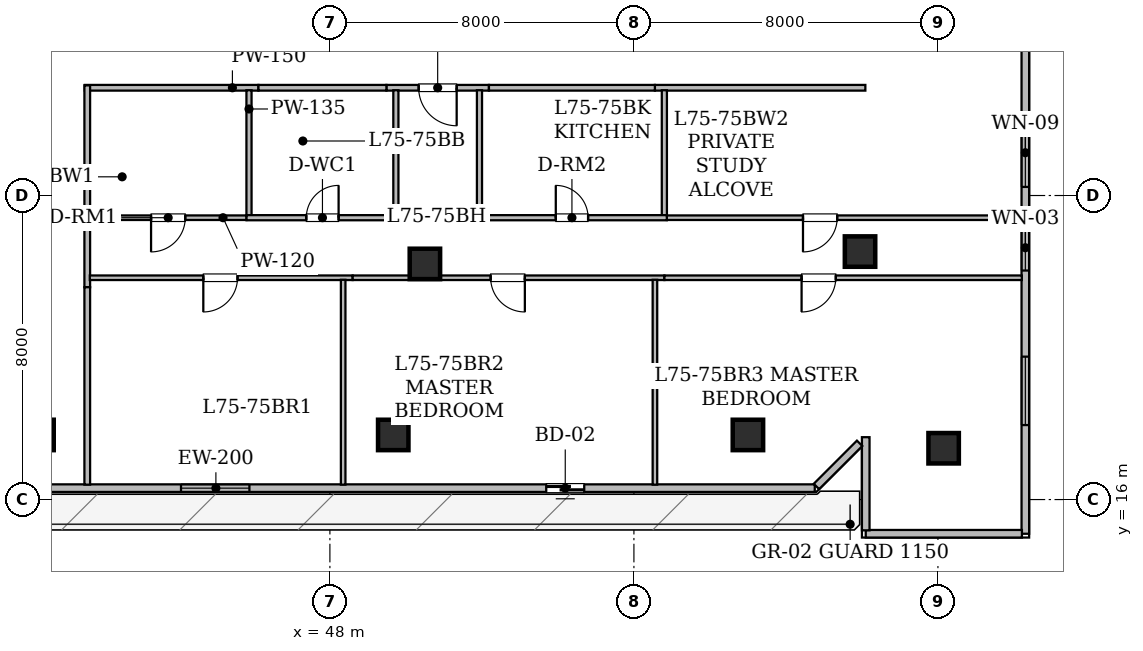
"""IFC4 building model, lengths in metres.
Left out: names, types, materials, properties, quantities, classifications, styles, units other than length and angle.
Written with IfcOpenShell. Run it as: python <this file> out.ifc"""

import sys

from ifc_helpers import new_model, si_unit, direction, frame, frame_2d, origin, origin_2d, place, context, subcontext, project, spatial, rectangle, hollow_rectangle, extrude, element, fill, save


model = new_model("IFC4")
c1 = context("Model", 3, precision=1e-05, world=origin(), true_north=direction((0.0, 1.0)))
c2 = subcontext(c1, "Body", "Model", "MODEL_VIEW")
j1 = project(units=[si_unit("LENGTHUNIT", "METRE"), si_unit("PLANEANGLEUNIT", "RADIAN")], contexts=[c1])
p1 = place(None, origin())
s1 = spatial("IfcSite", under=j1, at=p1, CompositionType="ELEMENT")
p2 = place(p1, origin())
s2 = spatial("IfcBuilding", under=s1, at=p2, CompositionType="ELEMENT")
p3 = place(p2, frame((0.0, 0.0, 294.65)))
s3 = spatial("IfcBuildingStorey", under=s2, at=p3, CompositionType="ELEMENT", Elevation=294.65)
for number, where, z_axis, x_axis in (
    (1, (40.333, 17.7, 0.025), (0.0, 0.0, 1.0), (1.0, 0.0, 0.0)),
    (2, (49.667, 17.7, 0.025), (0.0, 0.0, 1.0), (1.0, 0.0, 0.0)),
    (3, (59.0, 17.7, 0.025), (0.0, 0.0, 1.0), (1.0, 0.0, 0.0)),
    (4, (61.95, 22.525, 0.025), (0.0, 0.0, 1.0), (1.0, 0.0, 0.0)),
):
    element("IfcColumn", number, at=place(p3, frame(where, z_axis=z_axis, x_axis=x_axis)), inside=s3, PredefinedType="COLUMN", context=c2, shape_type="SweptSolid", body=[
        extrude(hollow_rectangle(XDim=0.8, YDim=0.8, WallThickness=0.04, at=origin_2d()), origin(), (0.0, 0.0, 1.0), 4.175),
    ])
p4 = place(p3, frame((50.5, 22.2, 0.0), z_axis=(0.0, 0.0, 1.0), x_axis=(1.0, 0.0, 0.0)))
e5 = element("IfcColumn", 5, at=p4, inside=s3, PredefinedType="COLUMN", context=c2, shape_type="SweptSolid", body=[
    extrude(hollow_rectangle(XDim=0.8, YDim=0.8, WallThickness=0.04, at=origin_2d()), origin(), (0.0, 0.0, 1.0), 4.2),
])
p5 = place(p3, frame((64.15, 17.35, 0.025), z_axis=(0.0, 0.0, 1.0), x_axis=(1.0, 0.0, 0.0)))
e6 = element("IfcColumn", 6, at=p5, inside=s3, PredefinedType="COLUMN", context=c2, shape_type="SweptSolid", body=[
    extrude(hollow_rectangle(XDim=0.8, YDim=0.8, WallThickness=0.04, at=origin_2d()), origin(), (0.0, 0.0, 1.0), 4.175),
])
p6 = place(p3, frame((60.759, 16.3, 0.0), z_axis=(0.0, 0.0, 1.0), x_axis=(-1.0, 0.0, 0.0)))
e7 = element("IfcWall", 7, at=p6, inside=s3, PredefinedType="STANDARD", context=c2, shape_type="SweptSolid", body=[
    extrude(rectangle(XDim=31.518, YDim=0.2, at=frame_2d((15.759, 0.0))), origin(), (0.0, 0.0, 1.0), 3.95),
])
p7 = place(p6, frame((6.066, 0.0, 0.0)))
e8 = element("IfcOpeningElement", 8, at=p7, cuts=e7, PredefinedType="OPENING", context=c2, shape_type="SweptSolid", body=[
    extrude(rectangle(XDim=1.0, YDim=2.15, at=frame_2d((0.5, 1.075))), frame((0.0, 0.11, 0.0), z_axis=(0.0, -1.0, 0.0), x_axis=(1.0, 0.0, 0.0)), (0.0, 0.0, 1.0), 0.22),
])
p8 = place(p6, frame((14.877, 0.0, 0.85)))
e9 = element("IfcOpeningElement", 9, at=p8, cuts=e7, PredefinedType="OPENING", context=c2, shape_type="SweptSolid", body=[
    extrude(rectangle(XDim=1.8, YDim=0.92, at=frame_2d((0.9, 0.46))), frame((0.0, 0.11, 0.0), z_axis=(0.0, -1.0, 0.0), x_axis=(1.0, 0.0, 0.0)), (0.0, 0.0, 1.0), 0.22),
])
p9 = place(p3, frame((66.3, 40.81, 0.0), z_axis=(0.0, 0.0, 1.0), x_axis=(0.0, -1.0, 0.0)))
e10 = element("IfcWall", 10, at=p9, inside=s3, PredefinedType="STANDARD", context=c2, shape_type="SweptSolid", body=[
    extrude(rectangle(XDim=25.71, YDim=0.2, at=frame_2d((12.855, 0.0))), origin(), (0.0, 0.0, 1.0), 3.95),
])
p10 = place(p9, frame((14.784, 0.0, 0.85)))
e11 = element("IfcOpeningElement", 11, at=p10, cuts=e10, PredefinedType="OPENING", context=c2, shape_type="SweptSolid", body=[
    extrude(rectangle(XDim=1.8, YDim=0.92, at=frame_2d((0.9, 0.46))), frame((0.0, 0.11, 0.0), z_axis=(0.0, -1.0, 0.0), x_axis=(1.0, 0.0, 0.0)), (0.0, 0.0, 1.0), 0.22),
])
p11 = place(p9, frame((17.584, 0.0, 0.78)))
e12 = element("IfcOpeningElement", 12, at=p11, cuts=e10, PredefinedType="OPENING", context=c2, shape_type="SweptSolid", body=[
    extrude(rectangle(XDim=1.2, YDim=1.5, at=frame_2d((0.6, 0.75))), frame((0.0, 0.11, 0.0), z_axis=(0.0, -1.0, 0.0), x_axis=(1.0, 0.0, 0.0)), (0.0, 0.0, 1.0), 0.22),
])
p12 = place(p9, frame((21.05, 0.0, 0.85)))
e13 = element("IfcOpeningElement", 13, at=p12, cuts=e10, PredefinedType="OPENING", context=c2, shape_type="SweptSolid", body=[
    extrude(rectangle(XDim=1.8, YDim=0.92, at=frame_2d((0.9, 0.46))), frame((0.0, 0.11, 0.0), z_axis=(0.0, -1.0, 0.0), x_axis=(1.0, 0.0, 0.0)), (0.0, 0.0, 1.0), 0.22),
])
p13 = place(p9, frame((7.176, 0.0, 0.78)))
e14 = element("IfcOpeningElement", 14, at=p13, cuts=e10, PredefinedType="OPENING", context=c2, shape_type="SweptSolid", body=[
    extrude(rectangle(XDim=1.2, YDim=1.5, at=frame_2d((0.6, 0.75))), frame((0.0, 0.11, 0.0), z_axis=(0.0, -1.0, 0.0), x_axis=(1.0, 0.0, 0.0)), (0.0, 0.0, 1.0), 0.22),
])
p14 = place(p9, frame((2.985, 0.0, 0.85)))
e15 = element("IfcOpeningElement", 15, at=p14, cuts=e10, PredefinedType="OPENING", context=c2, shape_type="SweptSolid", body=[
    extrude(rectangle(XDim=1.8, YDim=0.92, at=frame_2d((0.9, 0.46))), frame((0.0, 0.11, 0.0), z_axis=(0.0, -1.0, 0.0), x_axis=(1.0, 0.0, 0.0)), (0.0, 0.0, 1.0), 0.22),
])
p15 = place(p3, frame((66.21, 15.1, 0.0), z_axis=(0.0, 0.0, 1.0), x_axis=(-1.0, 0.0, 0.0)))
e16 = element("IfcWall", 16, at=p15, inside=s3, PredefinedType="STANDARD", context=c2, shape_type="SweptSolid", body=[
    extrude(rectangle(XDim=4.11, YDim=0.2, at=frame_2d((2.055, 0.0))), origin(), (0.0, 0.0, 1.0), 3.95),
])
p16 = place(p3, frame((62.1, 15.19, 0.0), z_axis=(0.0, 0.0, 1.0), x_axis=(0.0, 1.0, 0.0)))
e17 = element("IfcWall", 17, at=p16, inside=s3, PredefinedType="STANDARD", context=c2, shape_type="SweptSolid", body=[
    extrude(rectangle(XDim=2.451, YDim=0.2, at=frame_2d((1.226, 0.0))), origin(), (0.0, 0.0, 1.0), 3.95),
])
p17 = place(p3, frame((61.939, 17.48, 0.0), z_axis=(0.0, 0.0, 1.0), x_axis=(-0.707106781187, -0.707106781187, 0.0)))
e18 = element("IfcWall", 18, at=p17, inside=s3, PredefinedType="STANDARD", context=c2, shape_type="SweptSolid", body=[
    extrude(rectangle(XDim=1.606, YDim=0.2, at=frame_2d((0.803, 0.0))), origin(), (0.0, 0.0, 1.0), 3.95),
])
p18 = place(p3, frame((46.12, 26.835, 0.0), z_axis=(0.0, 0.0, 1.0), x_axis=(-1.0, 0.0, 0.0)))
e19 = element("IfcWall", 19, at=p18, inside=s3, PredefinedType="STANDARD", context=c2, shape_type="SweptSolid", body=[
    extrude(rectangle(XDim=4.57, YDim=0.15, at=frame_2d((2.285, 0.0))), origin(), (0.0, 0.0, 1.0), 3.95),
])
p19 = place(p3, frame((41.615, 26.898, 0.0), z_axis=(0.0, 0.0, 1.0), x_axis=(0.0, -1.0, 0.0)))
e20 = element("IfcWall", 20, at=p19, inside=s3, PredefinedType="STANDARD", context=c2, shape_type="SweptSolid", body=[
    extrude(rectangle(XDim=3.731, YDim=0.15, at=frame_2d((1.865, 0.0))), origin(), (0.0, 0.0, 1.0), 3.245),
])
p20 = place(p3, frame((62.09, 26.835, 0.0), z_axis=(0.0, 0.0, 1.0), x_axis=(-1.0, 0.0, 0.0)))
e21 = element("IfcWall", 21, at=p20, inside=s3, PredefinedType="STANDARD", context=c2, shape_type="SweptSolid", body=[
    extrude(rectangle(XDim=5.538, YDim=0.15, at=frame_2d((2.769, 0.0))), origin(), (0.0, 0.0, 1.0), 3.407),
])
p21 = place(p3, frame((52.185, 26.835, 0.0), z_axis=(0.0, 0.0, 1.0), x_axis=(-1.0, 0.0, 0.0)))
e22 = element("IfcWall", 22, at=p21, inside=s3, PredefinedType="STANDARD", context=c2, shape_type="SweptSolid", body=[
    extrude(rectangle(XDim=2.698, YDim=0.15, at=frame_2d((1.349, 0.0))), origin(), (0.0, 0.0, 1.0), 3.245),
])
p22 = place(p21, frame((0.849, 0.0, 0.0)))
e23 = element("IfcOpeningElement", 23, at=p22, cuts=e22, PredefinedType="OPENING", context=c2, shape_type="SweptSolid", body=[
    extrude(rectangle(XDim=1.0, YDim=2.15, at=frame_2d((0.5, 1.075))), frame((0.0, 0.085, 0.0), z_axis=(0.0, -1.0, 0.0), x_axis=(1.0, 0.0, 0.0)), (0.0, 0.0, 1.0), 0.17),
])
p23 = place(p3, frame((41.615, 23.167, 0.0), z_axis=(0.0, 0.0, 1.0), x_axis=(0.0, -1.0, 0.0)))
e24 = element("IfcWall", 24, at=p23, inside=s3, PredefinedType="STANDARD", context=c2, shape_type="SweptSolid", body=[
    extrude(rectangle(XDim=1.58, YDim=0.15, at=frame_2d((0.79, 0.0))), origin(), (0.0, 0.0, 1.0), 3.95),
])
p24 = place(p3, frame((49.487, 26.835, 0.0), z_axis=(0.0, 0.0, 1.0), x_axis=(-1.0, 0.0, 0.0)))
e25 = element("IfcWall", 25, at=p24, inside=s3, PredefinedType="STANDARD", context=c2, shape_type="SweptSolid", body=[
    extrude(rectangle(XDim=3.367, YDim=0.15, at=frame_2d((1.684, 0.0))), origin(), (0.0, 0.0, 1.0), 3.95),
])
p25 = place(p3, frame((56.552, 26.835, 0.0), z_axis=(0.0, 0.0, 1.0), x_axis=(-1.0, 0.0, 0.0)))
e26 = element("IfcWall", 26, at=p25, inside=s3, PredefinedType="STANDARD", context=c2, shape_type="SweptSolid", body=[
    extrude(rectangle(XDim=4.367, YDim=0.15, at=frame_2d((2.184, 0.0))), origin(), (0.0, 0.0, 1.0), 3.95),
])
p26 = place(p3, frame((41.615, 21.587, 0.0), z_axis=(0.0, 0.0, 1.0), x_axis=(0.0, -1.0, 0.0)))
e27 = element("IfcWall", 27, at=p26, inside=s3, PredefinedType="STANDARD", context=c2, shape_type="SweptSolid", body=[
    extrude(rectangle(XDim=5.195, YDim=0.15, at=frame_2d((2.597, 0.0))), origin(), (0.0, 0.0, 1.0), 3.407),
])
p27 = place(p3, frame((45.806, 23.416, 0.0), z_axis=(0.0, 0.0, 1.0), x_axis=(-1.0, 0.0, 0.0)))
e28 = element("IfcWall", 28, at=p27, inside=s3, PredefinedType="PARTITIONING", context=c2, shape_type="SweptSolid", body=[
    extrude(rectangle(XDim=4.124, YDim=0.12, at=frame_2d((2.062, 0.0))), origin(), (0.0, 0.0, 1.0), 3.245),
])
p28 = place(p27, frame((1.612, 0.0, 0.0)))
e29 = element("IfcOpeningElement", 29, at=p28, cuts=e28, PredefinedType="OPENING", context=c2, shape_type="SweptSolid", body=[
    extrude(rectangle(XDim=0.9, YDim=2.1, at=frame_2d((0.45, 1.05))), frame((0.0, 0.07, 0.0), z_axis=(0.0, -1.0, 0.0), x_axis=(1.0, 0.0, 0.0)), (0.0, 0.0, 1.0), 0.14),
])
p29 = place(p3, frame((45.871, 26.77, 0.0), z_axis=(0.0, 0.0, 1.0), x_axis=(0.0, -1.0, 0.0)))
e30 = element("IfcWall", 30, at=p29, inside=s3, PredefinedType="PARTITIONING", context=c2, shape_type="SweptSolid", body=[
    extrude(rectangle(XDim=3.289, YDim=0.135, at=frame_2d((1.645, 0.0))), origin(), (0.0, 0.0, 1.0), 3.95),
])
p30 = place(p3, frame((66.208, 23.416, 0.0), z_axis=(0.0, 0.0, 1.0), x_axis=(-1.0, 0.0, 0.0)))
e31 = element("IfcWall", 31, at=p30, inside=s3, PredefinedType="PARTITIONING", context=c2, shape_type="SweptSolid", body=[
    extrude(rectangle(XDim=9.342, YDim=0.12, at=frame_2d((4.671, 0.0))), origin(), (0.0, 0.0, 1.0), 3.245),
])
p31 = place(p30, frame((4.859, 0.0, 0.0)))
e32 = element("IfcOpeningElement", 32, at=p31, cuts=e31, PredefinedType="OPENING", context=c2, shape_type="SweptSolid", body=[
    extrude(rectangle(XDim=0.9, YDim=2.1, at=frame_2d((0.45, 1.05))), frame((0.0, 0.07, 0.0), z_axis=(0.0, -1.0, 0.0), x_axis=(1.0, 0.0, 0.0)), (0.0, 0.0, 1.0), 0.14),
])
p32 = place(p3, frame((56.801, 23.481, 0.0), z_axis=(0.0, 0.0, 1.0), x_axis=(0.0, 1.0, 0.0)))
e33 = element("IfcWall", 33, at=p32, inside=s3, PredefinedType="PARTITIONING", context=c2, shape_type="SweptSolid", body=[
    extrude(rectangle(XDim=3.289, YDim=0.135, at=frame_2d((1.645, 0.0))), origin(), (0.0, 0.0, 1.0), 3.95),
])
p33 = place(p3, frame((45.806, 23.416, 0.0), z_axis=(0.0, 0.0, 1.0), x_axis=(1.0, 0.0, 0.0)))
e34 = element("IfcWall", 34, at=p33, inside=s3, PredefinedType="PARTITIONING", context=c2, shape_type="SweptSolid", body=[
    extrude(rectangle(XDim=3.995, YDim=0.135, at=frame_2d((1.998, 0.0))), origin(), (0.0, 0.0, 1.0), 3.245),
])
p34 = place(p33, frame((1.573, 0.0, 0.0)))
e35 = element("IfcOpeningElement", 35, at=p34, cuts=e34, PredefinedType="OPENING", context=c2, shape_type="SweptSolid", body=[
    extrude(rectangle(XDim=0.85, YDim=2.1, at=frame_2d((0.425, 1.05))), frame((0.0, 0.077, 0.0), z_axis=(0.0, -1.0, 0.0), x_axis=(1.0, 0.0, 0.0)), (0.0, 0.0, 1.0), 0.155),
])
for number, where, z_axis, x_axis in (
    (36, (49.736, 23.351, 0.0), (0.0, 0.0, 1.0), (0.0, 1.0, 0.0)),
    (37, (51.936, 26.77, 0.0), (0.0, 0.0, 1.0), (0.0, -1.0, 0.0)),
):
    element("IfcWall", number, at=place(p3, frame(where, z_axis=z_axis, x_axis=x_axis)), inside=s3, PredefinedType="PARTITIONING", context=c2, shape_type="SweptSolid", body=[
        extrude(rectangle(XDim=3.419, YDim=0.135, at=frame_2d((1.709, 0.0))), origin(), (0.0, 0.0, 1.0), 3.95),
    ])
p35 = place(p3, frame((51.871, 23.416, 0.0), z_axis=(0.0, 0.0, 1.0), x_axis=(1.0, 0.0, 0.0)))
e38 = element("IfcWall", 38, at=p35, inside=s3, PredefinedType="PARTITIONING", context=c2, shape_type="SweptSolid", body=[
    extrude(rectangle(XDim=4.995, YDim=0.135, at=frame_2d((2.498, 0.0))), origin(), (0.0, 0.0, 1.0), 3.95),
])
p36 = place(p35, frame((2.073, 0.0, 0.0)))
e39 = element("IfcOpeningElement", 39, at=p36, cuts=e38, PredefinedType="OPENING", context=c2, shape_type="SweptSolid", body=[
    extrude(rectangle(XDim=0.85, YDim=2.1, at=frame_2d((0.425, 1.05))), frame((0.0, 0.077, 0.0), z_axis=(0.0, -1.0, 0.0), x_axis=(1.0, 0.0, 0.0)), (0.0, 0.0, 1.0), 0.155),
])
p37 = place(p3, frame((48.599, 21.836, 0.0), z_axis=(0.0, 0.0, 1.0), x_axis=(-1.0, 0.0, 0.0)))
e40 = element("IfcWall", 40, at=p37, inside=s3, PredefinedType="PARTITIONING", context=c2, shape_type="SweptSolid", body=[
    extrude(rectangle(XDim=6.917, YDim=0.12, at=frame_2d((3.458, 0.0))), origin(), (0.0, 0.0, 1.0), 3.95),
])
p38 = place(p37, frame((3.03, 0.0, 0.0)))
e41 = element("IfcOpeningElement", 41, at=p38, cuts=e40, PredefinedType="OPENING", context=c2, shape_type="SweptSolid", body=[
    extrude(rectangle(XDim=0.9, YDim=2.1, at=frame_2d((0.45, 1.05))), frame((0.0, 0.07, 0.0), z_axis=(0.0, -1.0, 0.0), x_axis=(1.0, 0.0, 0.0)), (0.0, 0.0, 1.0), 0.14),
])
p39 = place(p3, frame((56.802, 21.836, 0.0), z_axis=(0.0, 0.0, 1.0), x_axis=(-1.0, 0.0, 0.0)))
e42 = element("IfcWall", 42, at=p39, inside=s3, PredefinedType="PARTITIONING", context=c2, shape_type="SweptSolid", body=[
    extrude(rectangle(XDim=8.203, YDim=0.12, at=frame_2d((4.102, 0.0))), origin(), (0.0, 0.0, 1.0), 3.245),
])
p40 = place(p39, frame((3.672, 0.0, 0.0)))
e43 = element("IfcOpeningElement", 43, at=p40, cuts=e42, PredefinedType="OPENING", context=c2, shape_type="SweptSolid", body=[
    extrude(rectangle(XDim=0.9, YDim=2.1, at=frame_2d((0.45, 1.05))), frame((0.0, 0.07, 0.0), z_axis=(0.0, -1.0, 0.0), x_axis=(1.0, 0.0, 0.0)), (0.0, 0.0, 1.0), 0.14),
])
p41 = place(p3, frame((66.208, 21.836, 0.0), z_axis=(0.0, 0.0, 1.0), x_axis=(-1.0, 0.0, 0.0)))
e44 = element("IfcWall", 44, at=p41, inside=s3, PredefinedType="PARTITIONING", context=c2, shape_type="SweptSolid", body=[
    extrude(rectangle(XDim=9.406, YDim=0.12, at=frame_2d((4.703, 0.0))), origin(), (0.0, 0.0, 1.0), 3.245),
])
p42 = place(p41, frame((4.896, 0.0, 0.0)))
e45 = element("IfcOpeningElement", 45, at=p42, cuts=e44, PredefinedType="OPENING", context=c2, shape_type="SweptSolid", body=[
    extrude(rectangle(XDim=0.9, YDim=2.1, at=frame_2d((0.45, 1.05))), frame((0.0, 0.07, 0.0), z_axis=(0.0, -1.0, 0.0), x_axis=(1.0, 0.0, 0.0)), (0.0, 0.0, 1.0), 0.14),
])
p43 = place(p3, frame((48.349, 21.782, 0.0), z_axis=(0.0, 0.0, 1.0), x_axis=(0.0, -1.0, 0.0)))
e46 = element("IfcWall", 46, at=p43, inside=s3, PredefinedType="PARTITIONING", context=c2, shape_type="SweptSolid", body=[
    extrude(rectangle(XDim=5.39, YDim=0.12, at=frame_2d((2.695, 0.0))), origin(), (0.0, 0.0, 1.0), 3.407),
])
p44 = place(p3, frame((56.553, 21.782, 0.0), z_axis=(0.0, 0.0, 1.0), x_axis=(0.0, -1.0, 0.0)))
e47 = element("IfcWall", 47, at=p44, inside=s3, PredefinedType="PARTITIONING", context=c2, shape_type="SweptSolid", body=[
    extrude(rectangle(XDim=5.39, YDim=0.12, at=frame_2d((2.695, 0.0))), origin(), (0.0, 0.0, 1.0), 3.245),
])
p45 = place(p7, origin())
e48 = element("IfcDoor", 48, at=p45, inside=s3, OperationType="SLIDING_TO_LEFT", PredefinedType="DOOR", context=c2, shape_type="SweptSolid", body=[
    extrude(rectangle(XDim=1.0, YDim=2.15, at=frame_2d((0.5, 1.075))), frame((0.0, 0.025, 0.0), z_axis=(0.0, -1.0, 0.0), x_axis=(1.0, 0.0, 0.0)), (0.0, 0.0, 1.0), 0.05),
])
fill(e8, e48)
p46 = place(p10, origin())
e49 = element("IfcWindow", 49, at=p46, inside=s3, PartitioningType="SINGLE_PANEL", PredefinedType="WINDOW", context=c2, shape_type="SweptSolid", body=[
    extrude(rectangle(XDim=1.8, YDim=0.92, at=frame_2d((0.9, 0.46))), frame((0.0, 0.03, 0.0), z_axis=(0.0, -1.0, 0.0), x_axis=(1.0, 0.0, 0.0)), (0.0, 0.0, 1.0), 0.06),
])
fill(e11, e49)
p47 = place(p11, origin())
e50 = element("IfcWindow", 50, at=p47, inside=s3, PartitioningType="SINGLE_PANEL", PredefinedType="WINDOW", context=c2, shape_type="SweptSolid", body=[
    extrude(rectangle(XDim=1.2, YDim=1.5, at=frame_2d((0.6, 0.75))), frame((0.0, 0.03, 0.0), z_axis=(0.0, -1.0, 0.0), x_axis=(1.0, 0.0, 0.0)), (0.0, 0.0, 1.0), 0.06),
])
fill(e12, e50)
p48 = place(p8, origin())
e51 = element("IfcWindow", 51, at=p48, inside=s3, PartitioningType="SINGLE_PANEL", PredefinedType="WINDOW", context=c2, shape_type="SweptSolid", body=[
    extrude(rectangle(XDim=1.8, YDim=0.92, at=frame_2d((0.9, 0.46))), frame((0.0, 0.03, 0.0), z_axis=(0.0, -1.0, 0.0), x_axis=(1.0, 0.0, 0.0)), (0.0, 0.0, 1.0), 0.06),
])
fill(e9, e51)
p49 = place(p12, origin())
e52 = element("IfcWindow", 52, at=p49, inside=s3, PartitioningType="SINGLE_PANEL", PredefinedType="WINDOW", context=c2, shape_type="SweptSolid", body=[
    extrude(rectangle(XDim=1.8, YDim=0.92, at=frame_2d((0.9, 0.46))), frame((0.0, 0.03, 0.0), z_axis=(0.0, -1.0, 0.0), x_axis=(1.0, 0.0, 0.0)), (0.0, 0.0, 1.0), 0.06),
])
fill(e13, e52)
p50 = place(p22, origin())
e53 = element("IfcDoor", 53, at=p50, inside=s3, OperationType="SINGLE_SWING_LEFT", PredefinedType="DOOR", context=c2, shape_type="SweptSolid", body=[
    extrude(rectangle(XDim=1.0, YDim=2.15, at=frame_2d((0.5, 1.075))), frame((0.0, 0.025, 0.0), z_axis=(0.0, -1.0, 0.0), x_axis=(1.0, 0.0, 0.0)), (0.0, 0.0, 1.0), 0.05),
])
fill(e23, e53)
p51 = place(p28, origin())
e54 = element("IfcDoor", 54, at=p51, inside=s3, OperationType="SINGLE_SWING_RIGHT", PredefinedType="DOOR", context=c2, shape_type="SweptSolid", body=[
    extrude(rectangle(XDim=0.9, YDim=2.1, at=frame_2d((0.45, 1.05))), frame((0.0, 0.025, 0.0), z_axis=(0.0, -1.0, 0.0), x_axis=(1.0, 0.0, 0.0)), (0.0, 0.0, 1.0), 0.05),
])
fill(e29, e54)
p52 = place(p31, origin())
e55 = element("IfcDoor", 55, at=p52, inside=s3, OperationType="SINGLE_SWING_RIGHT", PredefinedType="DOOR", context=c2, shape_type="SweptSolid", body=[
    extrude(rectangle(XDim=0.9, YDim=2.1, at=frame_2d((0.45, 1.05))), frame((0.0, 0.025, 0.0), z_axis=(0.0, -1.0, 0.0), x_axis=(1.0, 0.0, 0.0)), (0.0, 0.0, 1.0), 0.05),
])
fill(e32, e55)
p53 = place(p34, origin())
e56 = element("IfcDoor", 56, at=p53, inside=s3, OperationType="SINGLE_SWING_RIGHT", PredefinedType="DOOR", context=c2, shape_type="SweptSolid", body=[
    extrude(rectangle(XDim=0.85, YDim=2.1, at=frame_2d((0.425, 1.05))), frame((0.0, 0.025, 0.0), z_axis=(0.0, -1.0, 0.0), x_axis=(1.0, 0.0, 0.0)), (0.0, 0.0, 1.0), 0.05),
])
fill(e35, e56)
p54 = place(p36, origin())
e57 = element("IfcDoor", 57, at=p54, inside=s3, OperationType="SINGLE_SWING_LEFT", PredefinedType="DOOR", context=c2, shape_type="SweptSolid", body=[
    extrude(rectangle(XDim=0.85, YDim=2.1, at=frame_2d((0.425, 1.05))), frame((0.0, 0.025, 0.0), z_axis=(0.0, -1.0, 0.0), x_axis=(1.0, 0.0, 0.0)), (0.0, 0.0, 1.0), 0.05),
])
fill(e39, e57)
p55 = place(p38, origin())
e58 = element("IfcDoor", 58, at=p55, inside=s3, OperationType="SINGLE_SWING_RIGHT", PredefinedType="DOOR", context=c2, shape_type="SweptSolid", body=[
    extrude(rectangle(XDim=0.9, YDim=2.1, at=frame_2d((0.45, 1.05))), frame((0.0, 0.025, 0.0), z_axis=(0.0, -1.0, 0.0), x_axis=(1.0, 0.0, 0.0)), (0.0, 0.0, 1.0), 0.05),
])
fill(e41, e58)
p56 = place(p40, origin())
e59 = element("IfcDoor", 59, at=p56, inside=s3, OperationType="SINGLE_SWING_LEFT", PredefinedType="DOOR", context=c2, shape_type="SweptSolid", body=[
    extrude(rectangle(XDim=0.9, YDim=2.1, at=frame_2d((0.45, 1.05))), frame((0.0, 0.025, 0.0), z_axis=(0.0, -1.0, 0.0), x_axis=(1.0, 0.0, 0.0)), (0.0, 0.0, 1.0), 0.05),
])
fill(e43, e59)
p57 = place(p42, origin())
e60 = element("IfcDoor", 60, at=p57, inside=s3, OperationType="SINGLE_SWING_RIGHT", PredefinedType="DOOR", context=c2, shape_type="SweptSolid", body=[
    extrude(rectangle(XDim=0.9, YDim=2.1, at=frame_2d((0.45, 1.05))), frame((0.0, 0.025, 0.0), z_axis=(0.0, -1.0, 0.0), x_axis=(1.0, 0.0, 0.0)), (0.0, 0.0, 1.0), 0.05),
])
fill(e45, e60)
save(model, sys.argv[1])
